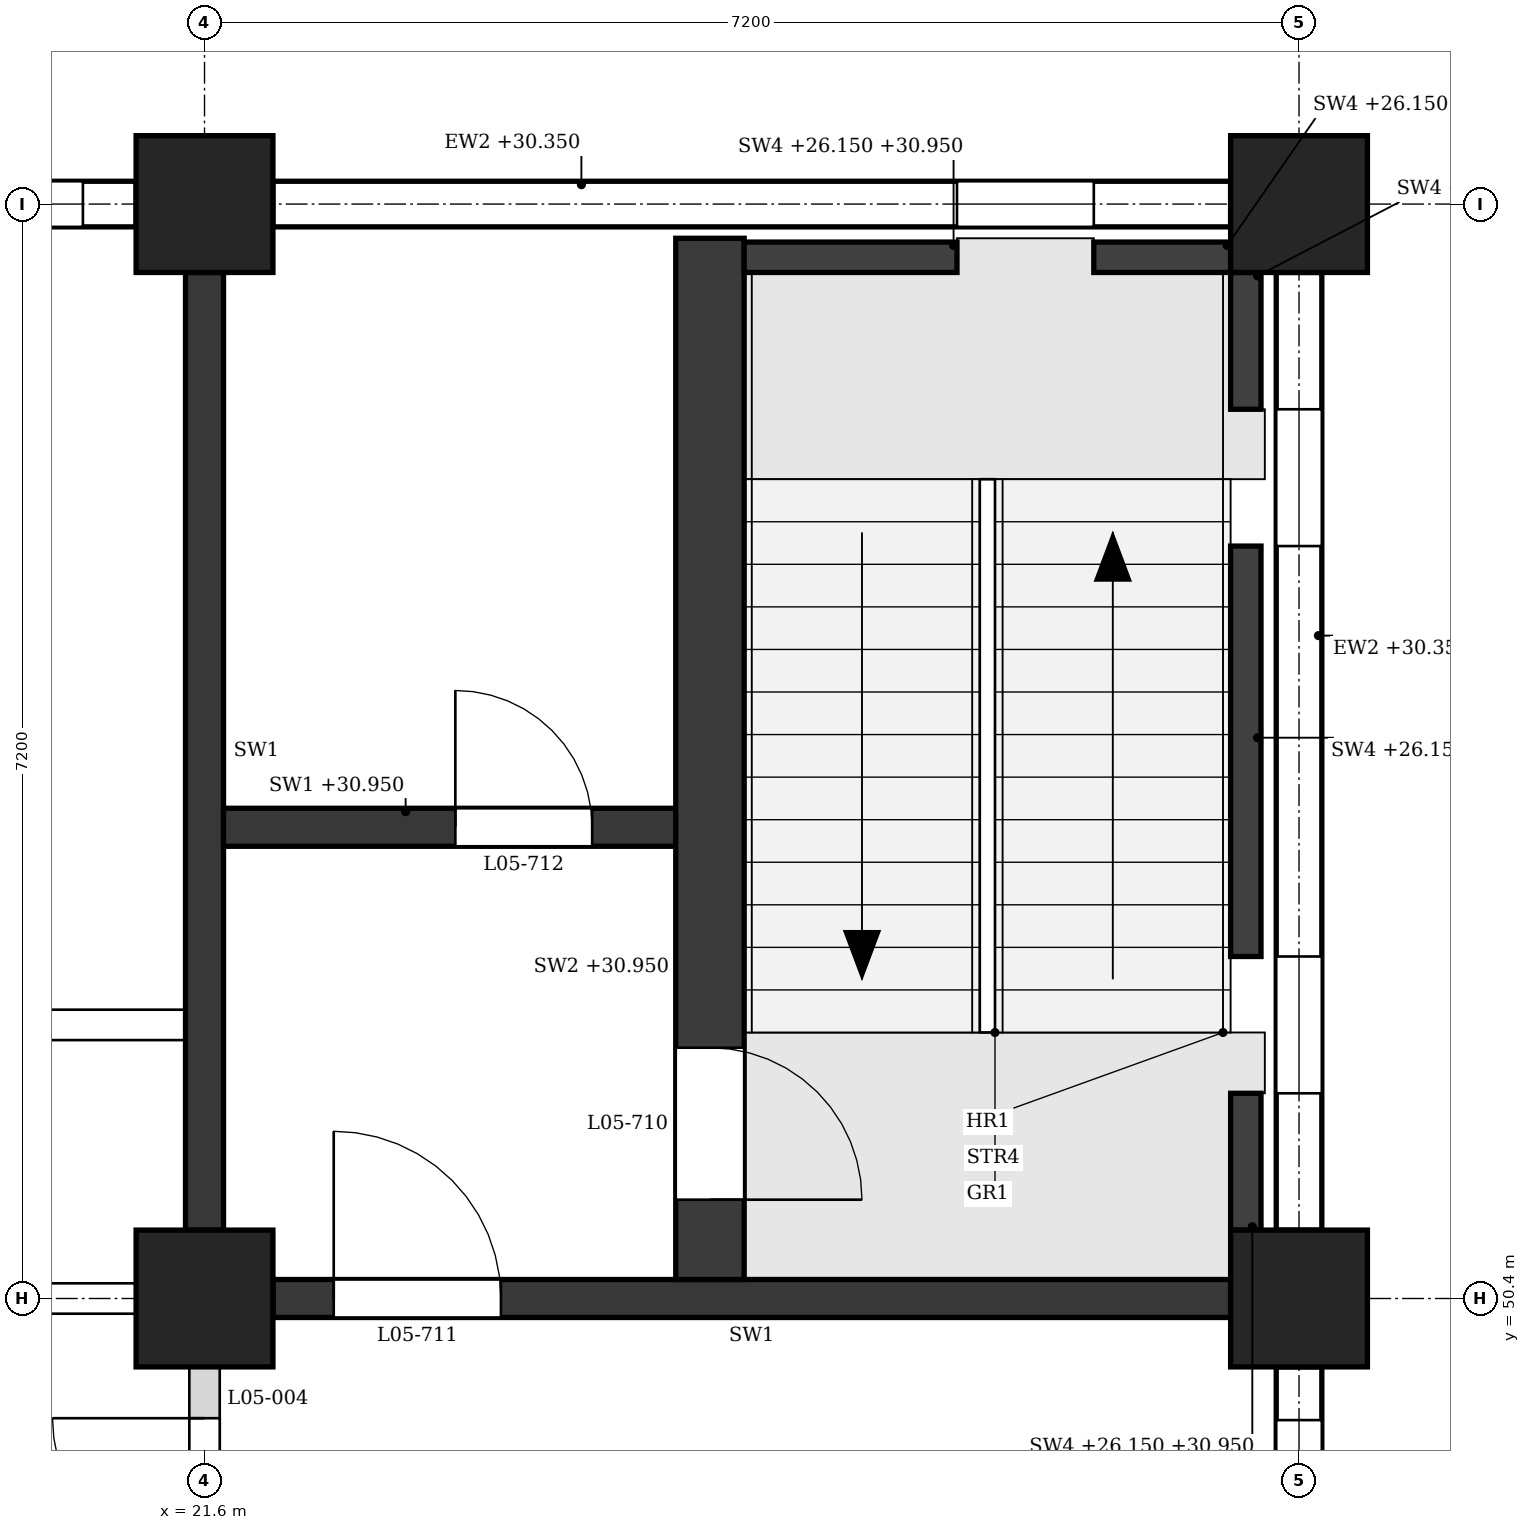
"""IFC4 building model, lengths in metres.
Left out: names, types, materials, properties, quantities, classifications, styles, units other than length and angle.
Written with IfcOpenShell. Run it as: python <this file> out.ifc"""

import sys

from ifc_helpers import new_model, si_unit, direction, frame, frame_2d, origin, origin_2d, place, context, subcontext, project, spatial, polyline, rectangle, outline, extrude, element, fill, save


model = new_model("IFC4")
c1 = context("Model", 3, precision=1e-05, world=origin(), true_north=direction((0.0, 1.0)))
c2 = subcontext(c1, "Body", "Model", "MODEL_VIEW")
j1 = project(units=[si_unit("LENGTHUNIT", "METRE"), si_unit("PLANEANGLEUNIT", "RADIAN")], contexts=[c1])
p1 = place(None, origin())
s1 = spatial("IfcSite", under=j1, at=p1, CompositionType="ELEMENT")
p2 = place(p1, origin())
s2 = spatial("IfcBuilding", under=s1, at=p2, CompositionType="ELEMENT")
p3 = place(p2, frame((0.0, 0.0, 26.4)))
s3 = spatial("IfcBuildingStorey", under=s2, at=p3, CompositionType="ELEMENT", Elevation=26.4)
for number, where, z_axis, x_axis in (
    (1, (21.6, 50.4, 0.0), (0.0, 0.0, 1.0), (1.0, 0.0, 0.0)),
    (2, (21.6, 57.6, 0.0), (0.0, 0.0, 1.0), (1.0, 0.0, 0.0)),
    (3, (28.8, 50.4, 0.0), (0.0, 0.0, 1.0), (1.0, 0.0, 0.0)),
    (4, (28.8, 57.6, 0.0), (0.0, 0.0, 1.0), (1.0, 0.0, 0.0)),
):
    element("IfcColumn", number, at=place(p3, frame(where, z_axis=z_axis, x_axis=x_axis)), inside=s3, PredefinedType="COLUMN", context=c2, shape_type="SweptSolid", body=[
        extrude(rectangle(XDim=0.9, YDim=0.9, at=origin_2d()), origin(), (0.0, 0.0, 1.0), 4.8),
    ])
p4 = place(p3, frame((28.35, 57.6, 0.0), z_axis=(0.0, 0.0, 1.0), x_axis=(-1.0, 0.0, 0.0)))
e5 = element("IfcWall", 5, at=p4, inside=s3, PredefinedType="STANDARD", context=c2, shape_type="SweptSolid", body=[
    extrude(rectangle(XDim=6.3, YDim=0.3, at=frame_2d((3.15, 0.0))), origin(), (0.0, 0.0, 1.0), 3.95),
])
p5 = place(p4, frame((0.9, 0.0, 0.9)))
e6 = element("IfcOpeningElement", 6, at=p5, cuts=e5, PredefinedType="OPENING", context=c2, shape_type="SweptSolid", body=[
    extrude(outline(polyline([(0.0, 0.0), (0.9, 0.0), (0.9, 2.05), (0.45, 2.5), (0.0, 2.05), (0.0, 0.0)])), frame((0.0, 0.16, 0.0), z_axis=(0.0, -1.0, 0.0), x_axis=(1.0, 0.0, 0.0)), (0.0, 0.0, 1.0), 0.32),
])
p6 = place(p3, frame((21.15, 57.6, 0.0), z_axis=(0.0, 0.0, 1.0), x_axis=(-1.0, 0.0, 0.0)))
e7 = element("IfcWall", 7, at=p6, inside=s3, PredefinedType="STANDARD", context=c2, shape_type="SweptSolid", body=[
    extrude(rectangle(XDim=6.3, YDim=0.3, at=frame_2d((3.15, 0.0))), origin(), (0.0, 0.0, 1.0), 3.95),
])
p7 = place(p6, frame((0.35, 0.0, 0.9)))
e8 = element("IfcOpeningElement", 8, at=p7, cuts=e7, PredefinedType="OPENING", context=c2, shape_type="SweptSolid", body=[
    extrude(outline(polyline([(0.0, 0.0), (0.85, 0.0), (0.85, 2.05), (0.425, 2.5), (0.0, 2.05), (0.0, 0.0)])), frame((0.0, 0.16, 0.0), z_axis=(0.0, -1.0, 0.0), x_axis=(1.0, 0.0, 0.0)), (0.0, 0.0, 1.0), 0.32),
])
p8 = place(p6, frame((1.5, 0.0, 0.9)))
e9 = element("IfcOpeningElement", 9, at=p8, cuts=e7, PredefinedType="OPENING", context=c2, shape_type="SweptSolid", body=[
    extrude(outline(polyline([(0.0, 0.0), (0.85, 0.0), (0.85, 2.05), (0.425, 2.5), (0.0, 2.05), (0.0, 0.0)])), frame((0.0, 0.16, 0.0), z_axis=(0.0, -1.0, 0.0), x_axis=(1.0, 0.0, 0.0)), (0.0, 0.0, 1.0), 0.32),
])
p9 = place(p6, frame((3.95, 0.0, 0.9)))
e10 = element("IfcOpeningElement", 10, at=p9, cuts=e7, PredefinedType="OPENING", context=c2, shape_type="SweptSolid", body=[
    extrude(outline(polyline([(0.0, 0.0), (0.85, 0.0), (0.85, 2.05), (0.425, 2.5), (0.0, 2.05), (0.0, 0.0)])), frame((0.0, 0.16, 0.0), z_axis=(0.0, -1.0, 0.0), x_axis=(1.0, 0.0, 0.0)), (0.0, 0.0, 1.0), 0.32),
])
p10 = place(p6, frame((5.1, 0.0, 0.9)))
e11 = element("IfcOpeningElement", 11, at=p10, cuts=e7, PredefinedType="OPENING", context=c2, shape_type="SweptSolid", body=[
    extrude(outline(polyline([(0.0, 0.0), (0.85, 0.0), (0.85, 2.05), (0.425, 2.5), (0.0, 2.05), (0.0, 0.0)])), frame((0.0, 0.16, 0.0), z_axis=(0.0, -1.0, 0.0), x_axis=(1.0, 0.0, 0.0)), (0.0, 0.0, 1.0), 0.32),
])
p11 = place(p3, frame((28.8, 43.65, 0.0), z_axis=(0.0, 0.0, 1.0), x_axis=(0.0, 1.0, 0.0)))
e12 = element("IfcWall", 12, at=p11, inside=s3, PredefinedType="STANDARD", context=c2, shape_type="SweptSolid", body=[
    extrude(rectangle(XDim=6.3, YDim=0.3, at=frame_2d((3.15, 0.0))), origin(), (0.0, 0.0, 1.0), 3.95),
])
p12 = place(p11, frame((3.95, 0.0, 0.9)))
e13 = element("IfcOpeningElement", 13, at=p12, cuts=e12, PredefinedType="OPENING", context=c2, shape_type="SweptSolid", body=[
    extrude(outline(polyline([(0.0, 0.0), (0.85, 0.0), (0.85, 2.05), (0.425, 2.5), (0.0, 2.05), (0.0, 0.0)])), frame((0.0, 0.16, 0.0), z_axis=(0.0, -1.0, 0.0), x_axis=(1.0, 0.0, 0.0)), (0.0, 0.0, 1.0), 0.32),
])
p13 = place(p11, frame((5.1, 0.0, 0.9)))
e14 = element("IfcOpeningElement", 14, at=p13, cuts=e12, PredefinedType="OPENING", context=c2, shape_type="SweptSolid", body=[
    extrude(outline(polyline([(0.0, 0.0), (0.85, 0.0), (0.85, 2.05), (0.425, 2.5), (0.0, 2.05), (0.0, 0.0)])), frame((0.0, 0.16, 0.0), z_axis=(0.0, -1.0, 0.0), x_axis=(1.0, 0.0, 0.0)), (0.0, 0.0, 1.0), 0.32),
])
p14 = place(p3, frame((28.8, 50.85, 0.0), z_axis=(0.0, 0.0, 1.0), x_axis=(0.0, 1.0, 0.0)))
e15 = element("IfcWall", 15, at=p14, inside=s3, PredefinedType="STANDARD", context=c2, shape_type="SweptSolid", body=[
    extrude(rectangle(XDim=6.3, YDim=0.3, at=frame_2d((3.15, 0.0))), origin(), (0.0, 0.0, 1.0), 3.95),
])
p15 = place(p14, frame((0.9, 0.0, 0.9)))
e16 = element("IfcOpeningElement", 16, at=p15, cuts=e15, PredefinedType="OPENING", context=c2, shape_type="SweptSolid", body=[
    extrude(outline(polyline([(0.0, 0.0), (0.9, 0.0), (0.9, 2.05), (0.45, 2.5), (0.0, 2.05), (0.0, 0.0)])), frame((0.0, 0.16, 0.0), z_axis=(0.0, -1.0, 0.0), x_axis=(1.0, 0.0, 0.0)), (0.0, 0.0, 1.0), 0.32),
])
p16 = place(p14, frame((4.5, 0.0, 0.9)))
e17 = element("IfcOpeningElement", 17, at=p16, cuts=e15, PredefinedType="OPENING", context=c2, shape_type="SweptSolid", body=[
    extrude(outline(polyline([(0.0, 0.0), (0.9, 0.0), (0.9, 2.05), (0.45, 2.5), (0.0, 2.05), (0.0, 0.0)])), frame((0.0, 0.16, 0.0), z_axis=(0.0, -1.0, 0.0), x_axis=(1.0, 0.0, 0.0)), (0.0, 0.0, 1.0), 0.32),
])
p17 = place(p3, frame((22.05, 50.4, 0.0), z_axis=(0.0, 0.0, 1.0), x_axis=(1.0, 0.0, 0.0)))
e18 = element("IfcWall", 18, at=p17, inside=s3, PredefinedType="SHEAR", context=c2, shape_type="SweptSolid", body=[
    extrude(rectangle(XDim=6.3, YDim=0.25, at=frame_2d((3.15, 0.0))), origin(), (0.0, 0.0, 1.0), 3.8),
])
p18 = place(p17, frame((0.4, 0.0, 0.0)))
e19 = element("IfcOpeningElement", 19, at=p18, cuts=e18, PredefinedType="OPENING", context=c2, shape_type="SweptSolid", body=[
    extrude(rectangle(XDim=1.1, YDim=2.1, at=frame_2d((0.55, 1.05))), frame((0.0, 0.135, 0.0), z_axis=(0.0, -1.0, 0.0), x_axis=(1.0, 0.0, 0.0)), (0.0, 0.0, 1.0), 0.27),
])
p19 = place(p3, frame((21.6, 50.85, 0.0), z_axis=(0.0, 0.0, 1.0), x_axis=(0.0, 1.0, 0.0)))
e20 = element("IfcWall", 20, at=p19, inside=s3, PredefinedType="SHEAR", context=c2, shape_type="SweptSolid", body=[
    extrude(rectangle(XDim=6.3, YDim=0.25, at=frame_2d((3.15, 0.0))), origin(), (0.0, 0.0, 1.0), 3.8),
])
p20 = place(p3, frame((28.45, 50.85, -0.25), z_axis=(0.0, 0.0, 1.0), x_axis=(0.0, 1.0, 0.0)))
e21 = element("IfcWall", 21, at=p20, inside=s3, PredefinedType="SHEAR", context=c2, shape_type="SweptSolid", body=[
    extrude(rectangle(XDim=0.9, YDim=0.2, at=frame_2d((0.45, 0.0))), origin(), (0.0, 0.0, 1.0), 4.8),
])
p21 = place(p3, frame((28.45, 52.65, -0.25), z_axis=(0.0, 0.0, 1.0), x_axis=(0.0, 1.0, 0.0)))
e22 = element("IfcWall", 22, at=p21, inside=s3, PredefinedType="SHEAR", context=c2, shape_type="SweptSolid", body=[
    extrude(rectangle(XDim=2.7, YDim=0.2, at=frame_2d((1.35, 0.0))), origin(), (0.0, 0.0, 1.0), 4.8),
])
p22 = place(p3, frame((28.45, 56.25, -0.25), z_axis=(0.0, 0.0, 1.0), x_axis=(0.0, 1.0, 0.0)))
e23 = element("IfcWall", 23, at=p22, inside=s3, PredefinedType="SHEAR", context=c2, shape_type="SweptSolid", body=[
    extrude(rectangle(XDim=0.9, YDim=0.2, at=frame_2d((0.45, 0.0))), origin(), (0.0, 0.0, 1.0), 4.8),
])
p23 = place(p3, frame((25.15, 57.25, -0.25), z_axis=(0.0, 0.0, 1.0), x_axis=(1.0, 0.0, 0.0)))
e24 = element("IfcWall", 24, at=p23, inside=s3, PredefinedType="SHEAR", context=c2, shape_type="SweptSolid", body=[
    extrude(rectangle(XDim=1.4, YDim=0.2, at=frame_2d((0.7, 0.0))), origin(), (0.0, 0.0, 1.0), 4.8),
])
p24 = place(p3, frame((27.45, 57.25, -0.25), z_axis=(0.0, 0.0, 1.0), x_axis=(1.0, 0.0, 0.0)))
e25 = element("IfcWall", 25, at=p24, inside=s3, PredefinedType="SHEAR", context=c2, shape_type="SweptSolid", body=[
    extrude(rectangle(XDim=0.9, YDim=0.2, at=frame_2d((0.45, 0.0))), origin(), (0.0, 0.0, 1.0), 4.8),
])
p25 = place(p3, frame((24.925, 50.525, 0.0), z_axis=(0.0, 0.0, 1.0), x_axis=(0.0, 1.0, 0.0)))
e26 = element("IfcWall", 26, at=p25, inside=s3, PredefinedType="SHEAR", context=c2, shape_type="SweptSolid", body=[
    extrude(rectangle(XDim=6.85, YDim=0.45, at=frame_2d((3.425, 0.0))), origin(), (0.0, 0.0, 1.0), 4.55),
])
p26 = place(p25, frame((0.525, 0.0, 0.0)))
e27 = element("IfcOpeningElement", 27, at=p26, cuts=e26, PredefinedType="OPENING", context=c2, shape_type="SweptSolid", body=[
    extrude(rectangle(XDim=1.0, YDim=2.1, at=frame_2d((0.5, 1.05))), frame((0.0, 0.235, 0.0), z_axis=(0.0, -1.0, 0.0), x_axis=(1.0, 0.0, 0.0)), (0.0, 0.0, 1.0), 0.47),
])
p27 = place(p3, frame((21.725, 53.5, 0.0), z_axis=(0.0, 0.0, 1.0), x_axis=(1.0, 0.0, 0.0)))
e28 = element("IfcWall", 28, at=p27, inside=s3, PredefinedType="SHEAR", context=c2, shape_type="SweptSolid", body=[
    extrude(rectangle(XDim=2.975, YDim=0.25, at=frame_2d((1.487, 0.0))), origin(), (0.0, 0.0, 1.0), 4.55),
])
p28 = place(p27, frame((1.525, 0.0, 0.0)))
e29 = element("IfcOpeningElement", 29, at=p28, cuts=e28, PredefinedType="OPENING", context=c2, shape_type="SweptSolid", body=[
    extrude(rectangle(XDim=0.9, YDim=2.1, at=frame_2d((0.45, 1.05))), frame((0.0, 0.135, 0.0), z_axis=(0.0, -1.0, 0.0), x_axis=(1.0, 0.0, 0.0)), (0.0, 0.0, 1.0), 0.27),
])
p29 = place(p3, frame((14.85, 50.4, 0.0), z_axis=(0.0, 0.0, 1.0), x_axis=(1.0, 0.0, 0.0)))
e30 = element("IfcWall", 30, at=p29, inside=s3, PredefinedType="PARTITIONING", context=c2, shape_type="SweptSolid", body=[
    extrude(rectangle(XDim=6.3, YDim=0.2, at=frame_2d((3.15, 0.0))), origin(), (0.0, 0.0, 1.0), 3.8),
])
p30 = place(p29, frame((4.225, 0.0, 0.0)))
e31 = element("IfcOpeningElement", 31, at=p30, cuts=e30, PredefinedType="OPENING", context=c2, shape_type="SweptSolid", body=[
    extrude(rectangle(XDim=1.0, YDim=2.1, at=frame_2d((0.5, 1.05))), frame((0.0, 0.11, 0.0), z_axis=(0.0, -1.0, 0.0), x_axis=(1.0, 0.0, 0.0)), (0.0, 0.0, 1.0), 0.22),
])
p31 = place(p3, frame((7.325, 52.2, 0.0), z_axis=(0.0, 0.0, 1.0), x_axis=(1.0, 0.0, 0.0)))
e32 = element("IfcWall", 32, at=p31, inside=s3, PredefinedType="PARTITIONING", context=c2, shape_type="SweptSolid", body=[
    extrude(outline(polyline([(0.0, 0.0), (14.15, 0.0), (14.15, 3.8), (14.025, 3.8), (14.025, 4.55), (7.325, 4.55), (7.325, 3.8), (6.825, 3.8), (6.825, 4.55), (0.125, 4.55), (0.125, 3.8), (0.0, 3.8), (0.0, 0.0)])), frame((0.0, 0.1, 0.0), z_axis=(0.0, -1.0, 0.0), x_axis=(1.0, 0.0, 0.0)), (0.0, 0.0, 1.0), 0.2),
])
p32 = place(p31, frame((1.238, 0.0, 0.0)))
e33 = element("IfcOpeningElement", 33, at=p32, cuts=e32, PredefinedType="OPENING", context=c2, shape_type="SweptSolid", body=[
    extrude(rectangle(XDim=1.0, YDim=2.1, at=frame_2d((0.5, 1.05))), frame((0.0, 0.11, 0.0), z_axis=(0.0, -1.0, 0.0), x_axis=(1.0, 0.0, 0.0)), (0.0, 0.0, 1.0), 0.22),
])
p33 = place(p31, frame((4.775, 0.0, 0.0)))
e34 = element("IfcOpeningElement", 34, at=p33, cuts=e32, PredefinedType="OPENING", context=c2, shape_type="SweptSolid", body=[
    extrude(rectangle(XDim=1.0, YDim=2.1, at=frame_2d((0.5, 1.05))), frame((0.0, 0.11, 0.0), z_axis=(0.0, -1.0, 0.0), x_axis=(1.0, 0.0, 0.0)), (0.0, 0.0, 1.0), 0.22),
])
p34 = place(p31, frame((8.375, 0.0, 0.0)))
e35 = element("IfcOpeningElement", 35, at=p34, cuts=e32, PredefinedType="OPENING", context=c2, shape_type="SweptSolid", body=[
    extrude(rectangle(XDim=1.0, YDim=2.1, at=frame_2d((0.5, 1.05))), frame((0.0, 0.11, 0.0), z_axis=(0.0, -1.0, 0.0), x_axis=(1.0, 0.0, 0.0)), (0.0, 0.0, 1.0), 0.22),
])
p35 = place(p31, frame((11.913, 0.0, 0.0)))
e36 = element("IfcOpeningElement", 36, at=p35, cuts=e32, PredefinedType="OPENING", context=c2, shape_type="SweptSolid", body=[
    extrude(rectangle(XDim=1.0, YDim=2.1, at=frame_2d((0.5, 1.05))), frame((0.0, 0.11, 0.0), z_axis=(0.0, -1.0, 0.0), x_axis=(1.0, 0.0, 0.0)), (0.0, 0.0, 1.0), 0.22),
])
p36 = place(p3, frame((21.6, 47.275, 0.0), z_axis=(0.0, 0.0, 1.0), x_axis=(0.0, 1.0, 0.0)))
e37 = element("IfcWall", 37, at=p36, inside=s3, PredefinedType="PARTITIONING", context=c2, shape_type="SweptSolid", body=[
    extrude(rectangle(XDim=2.675, YDim=0.2, at=frame_2d((1.337, 0.0))), origin(), (0.0, 0.0, 1.0), 3.8),
])
p37 = place(p36, frame((0.337, 0.0, 0.0)))
e38 = element("IfcOpeningElement", 38, at=p37, cuts=e37, PredefinedType="OPENING", context=c2, shape_type="SweptSolid", body=[
    extrude(rectangle(XDim=2.0, YDim=2.4, at=frame_2d((1.0, 1.2))), frame((0.0, 0.11, 0.0), z_axis=(0.0, -1.0, 0.0), x_axis=(1.0, 0.0, 0.0)), (0.0, 0.0, 1.0), 0.22),
])
p38 = place(p13, origin())
e39 = element("IfcWindow", 39, at=p38, inside=s3, PartitioningType="SINGLE_PANEL", PredefinedType="WINDOW", context=c2, shape_type="SweptSolid", body=[
    extrude(outline(polyline([(0.0, 0.0), (0.85, 0.0), (0.85, 2.05), (0.425, 2.5), (0.0, 2.05), (0.0, 0.0)])), frame((0.0, 0.03, 0.0), z_axis=(0.0, -1.0, 0.0), x_axis=(1.0, 0.0, 0.0)), (0.0, 0.0, 1.0), 0.06),
])
fill(e14, e39)
p39 = place(p15, origin())
e40 = element("IfcWindow", 40, at=p39, inside=s3, PartitioningType="SINGLE_PANEL", PredefinedType="WINDOW", context=c2, shape_type="SweptSolid", body=[
    extrude(outline(polyline([(0.0, 0.0), (0.9, 0.0), (0.9, 2.05), (0.45, 2.5), (0.0, 2.05), (0.0, 0.0)])), frame((0.0, 0.03, 0.0), z_axis=(0.0, -1.0, 0.0), x_axis=(1.0, 0.0, 0.0)), (0.0, 0.0, 1.0), 0.06),
])
fill(e16, e40)
p40 = place(p16, origin())
e41 = element("IfcWindow", 41, at=p40, inside=s3, PartitioningType="SINGLE_PANEL", PredefinedType="WINDOW", context=c2, shape_type="SweptSolid", body=[
    extrude(outline(polyline([(0.0, 0.0), (0.9, 0.0), (0.9, 2.05), (0.45, 2.5), (0.0, 2.05), (0.0, 0.0)])), frame((0.0, 0.03, 0.0), z_axis=(0.0, -1.0, 0.0), x_axis=(1.0, 0.0, 0.0)), (0.0, 0.0, 1.0), 0.06),
])
fill(e17, e41)
p41 = place(p5, origin())
e42 = element("IfcWindow", 42, at=p41, inside=s3, PartitioningType="SINGLE_PANEL", PredefinedType="WINDOW", context=c2, shape_type="SweptSolid", body=[
    extrude(outline(polyline([(0.0, 0.0), (0.9, 0.0), (0.9, 2.05), (0.45, 2.5), (0.0, 2.05), (0.0, 0.0)])), frame((0.0, 0.03, 0.0), z_axis=(0.0, -1.0, 0.0), x_axis=(1.0, 0.0, 0.0)), (0.0, 0.0, 1.0), 0.06),
])
fill(e6, e42)
p42 = place(p7, origin())
e43 = element("IfcWindow", 43, at=p42, inside=s3, PartitioningType="SINGLE_PANEL", PredefinedType="WINDOW", context=c2, shape_type="SweptSolid", body=[
    extrude(outline(polyline([(0.0, 0.0), (0.85, 0.0), (0.85, 2.05), (0.425, 2.5), (0.0, 2.05), (0.0, 0.0)])), frame((0.0, 0.03, 0.0), z_axis=(0.0, -1.0, 0.0), x_axis=(1.0, 0.0, 0.0)), (0.0, 0.0, 1.0), 0.06),
])
fill(e8, e43)
p43 = place(p26, frame((1.0, 0.0, 0.0), z_axis=(0.0, 0.0, 1.0), x_axis=(-1.0, 0.0, 0.0)))
e44 = element("IfcDoor", 44, at=p43, inside=s3, OperationType="SINGLE_SWING_RIGHT", PredefinedType="DOOR", context=c2, shape_type="SweptSolid", body=[
    extrude(rectangle(XDim=1.0, YDim=2.1, at=frame_2d((0.5, 1.05))), frame((0.0, 0.025, 0.0), z_axis=(0.0, -1.0, 0.0), x_axis=(1.0, 0.0, 0.0)), (0.0, 0.0, 1.0), 0.05),
])
fill(e27, e44)
p44 = place(p18, origin())
e45 = element("IfcDoor", 45, at=p44, inside=s3, OperationType="SINGLE_SWING_LEFT", PredefinedType="DOOR", context=c2, shape_type="SweptSolid", body=[
    extrude(rectangle(XDim=1.1, YDim=2.1, at=frame_2d((0.55, 1.05))), frame((0.0, 0.025, 0.0), z_axis=(0.0, -1.0, 0.0), x_axis=(1.0, 0.0, 0.0)), (0.0, 0.0, 1.0), 0.05),
])
fill(e19, e45)
p45 = place(p28, origin())
e46 = element("IfcDoor", 46, at=p45, inside=s3, OperationType="SINGLE_SWING_LEFT", PredefinedType="DOOR", context=c2, shape_type="SweptSolid", body=[
    extrude(rectangle(XDim=0.9, YDim=2.1, at=frame_2d((0.45, 1.05))), frame((0.0, 0.025, 0.0), z_axis=(0.0, -1.0, 0.0), x_axis=(1.0, 0.0, 0.0)), (0.0, 0.0, 1.0), 0.05),
])
fill(e29, e46)
p46 = place(p37, origin())
e47 = element("IfcDoor", 47, at=p46, inside=s3, OperationType="DOUBLE_DOOR_SINGLE_SWING", PredefinedType="DOOR", context=c2, shape_type="SweptSolid", body=[
    extrude(rectangle(XDim=2.0, YDim=2.4, at=frame_2d((1.0, 1.2))), frame((0.0, 0.025, 0.0), z_axis=(0.0, -1.0, 0.0), x_axis=(1.0, 0.0, 0.0)), (0.0, 0.0, 1.0), 0.05),
])
fill(e38, e47)
save(model, sys.argv[1])
